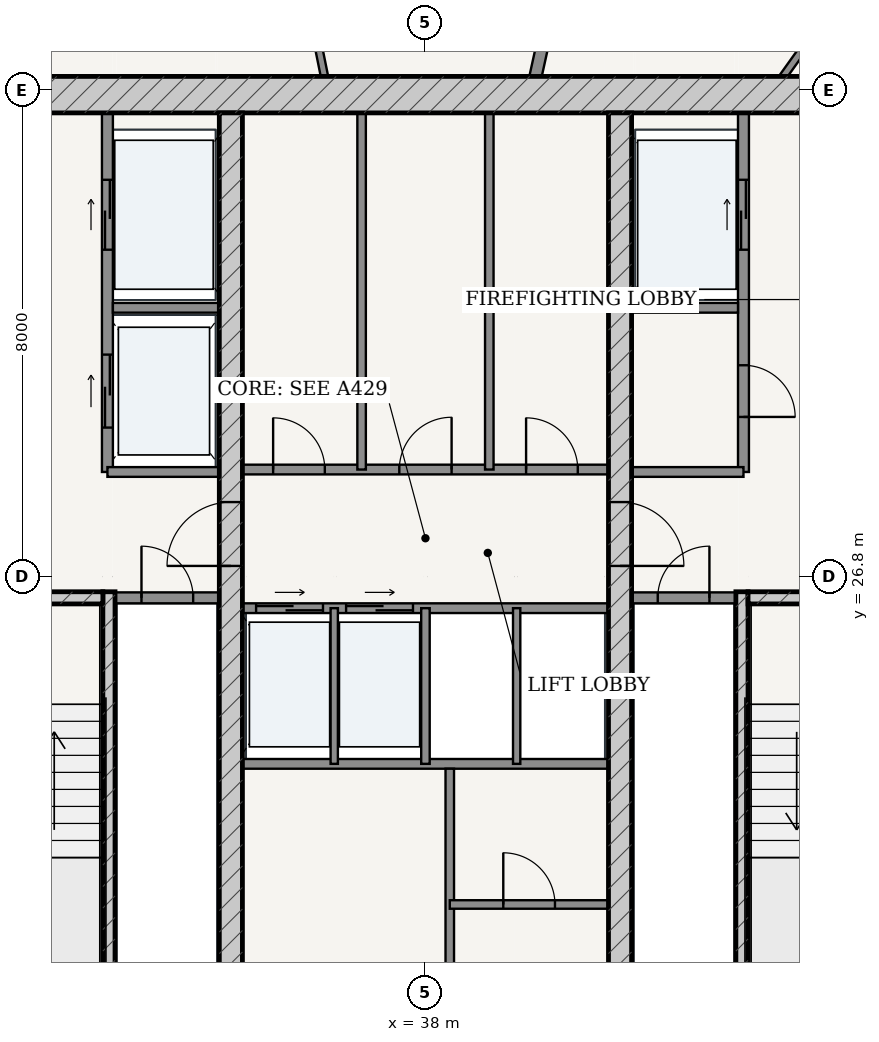
"""IFC4 building model, lengths in metres.
Left out: names, types, materials, properties, quantities, classifications, styles, units other than length and angle.
Written with IfcOpenShell. Run it as: python <this file> out.ifc"""

import sys

from ifc_helpers import new_model, si_unit, direction, frame, frame_2d, origin, place, context, subcontext, project, spatial, rectangle, extrude, source, transform, mapped, element, fill, save


model = new_model("IFC4")
c1 = context("Model", 3, precision=1e-05, world=origin(), true_north=direction((-0.2419218956, 0.970295726276)))
c2 = subcontext(c1, "Body", "Model", "MODEL_VIEW")
j1 = project(units=[si_unit("LENGTHUNIT", "METRE"), si_unit("PLANEANGLEUNIT", "RADIAN")], contexts=[c1])
p1 = place(None, origin())
s1 = spatial("IfcSite", under=j1, at=p1, CompositionType="ELEMENT")
p2 = place(p1, origin())
s2 = spatial("IfcBuilding", under=s1, at=p2, CompositionType="ELEMENT")
p3 = place(p2, frame((0.0, 0.0, 217.1)))
s3 = spatial("IfcBuildingStorey", under=s2, at=p3, CompositionType="ELEMENT", Elevation=217.1)
p4 = place(p3, frame((28.775, 34.725, 0.0), z_axis=(0.0, 0.0, 1.0), x_axis=(1.0, 0.0, 0.0)))
e1 = element("IfcWall", 1, at=p4, inside=s3, PredefinedType="SHEAR", context=c2, shape_type="SweptSolid", body=[
    extrude(rectangle(XDim=18.45, YDim=0.6, at=frame_2d((9.225, 0.0))), origin(), (0.0, 0.0, 1.0), 3.435),
])
p5 = place(p3, frame((32.795, 19.175, 0.0), z_axis=(0.0, 0.0, 1.0), x_axis=(0.0, 1.0, 0.0)))
e2 = element("IfcWall", 2, at=p5, inside=s3, PredefinedType="SOLIDWALL", context=c2, shape_type="SweptSolid", body=[
    extrude(rectangle(XDim=7.375, YDim=0.2, at=frame_2d((3.688, 0.0))), origin(), (0.0, 0.0, 1.0), 3.435),
])
p6 = place(p3, frame((29.375, 26.45, 0.0), z_axis=(0.0, 0.0, 1.0), x_axis=(1.0, 0.0, 0.0)))
e3 = element("IfcWall", 3, at=p6, inside=s3, PredefinedType="SOLIDWALL", context=c2, shape_type="SweptSolid", body=[
    extrude(rectangle(XDim=3.32, YDim=0.2, at=frame_2d((1.66, 0.0))), origin(), (0.0, 0.0, 1.0), 3.435),
])
p7 = place(p6, frame((1.185, 0.0, 0.0)))
e4 = element("IfcOpeningElement", 4, at=p7, cuts=e3, PredefinedType="OPENING", context=c2, shape_type="SweptSolid", body=[
    extrude(rectangle(XDim=0.95, YDim=2.15, at=frame_2d((0.475, 1.075))), frame((0.0, 0.11, 0.0), z_axis=(0.0, -1.0, 0.0), x_axis=(1.0, 0.0, 0.0)), (0.0, 0.0, 1.0), 0.22),
])
p8 = place(p3, frame((43.205, 19.175, 0.0), z_axis=(0.0, 0.0, 1.0), x_axis=(0.0, 1.0, 0.0)))
e5 = element("IfcWall", 5, at=p8, inside=s3, PredefinedType="SOLIDWALL", context=c2, shape_type="SweptSolid", body=[
    extrude(rectangle(XDim=7.375, YDim=0.2, at=frame_2d((3.688, 0.0))), origin(), (0.0, 0.0, 1.0), 3.435),
])
p9 = place(p3, frame((43.305, 26.45, 0.0), z_axis=(0.0, 0.0, 1.0), x_axis=(1.0, 0.0, 0.0)))
e6 = element("IfcWall", 6, at=p9, inside=s3, PredefinedType="SOLIDWALL", context=c2, shape_type="SweptSolid", body=[
    extrude(rectangle(XDim=3.32, YDim=0.2, at=frame_2d((1.66, 0.0))), origin(), (0.0, 0.0, 1.0), 3.435),
])
p10 = place(p9, frame((1.185, 0.0, 0.0)))
e7 = element("IfcOpeningElement", 7, at=p10, cuts=e6, PredefinedType="OPENING", context=c2, shape_type="SweptSolid", body=[
    extrude(rectangle(XDim=0.95, YDim=2.15, at=frame_2d((0.475, 1.075))), frame((0.0, 0.11, 0.0), z_axis=(0.0, -1.0, 0.0), x_axis=(1.0, 0.0, 0.0)), (0.0, 0.0, 1.0), 0.22),
])
p11 = place(p3, frame((34.8, 19.175, 0.0), z_axis=(0.0, 0.0, 1.0), x_axis=(0.0, 1.0, 0.0)))
e8 = element("IfcWall", 8, at=p11, inside=s3, PredefinedType="SHEAR", context=c2, shape_type="SweptSolid", body=[
    extrude(rectangle(XDim=15.25, YDim=0.38, at=frame_2d((7.625, 0.0))), origin(), (0.0, 0.0, 1.0), 3.435),
])
p12 = place(p11, frame((7.8, 0.0, 0.0)))
e9 = element("IfcOpeningElement", 9, at=p12, cuts=e8, PredefinedType="OPENING", context=c2, shape_type="SweptSolid", body=[
    extrude(rectangle(XDim=1.05, YDim=2.15, at=frame_2d((0.525, 1.075))), frame((0.0, 0.2, 0.0), z_axis=(0.0, -1.0, 0.0), x_axis=(1.0, 0.0, 0.0)), (0.0, 0.0, 1.0), 0.4),
])
p13 = place(p3, frame((41.2, 19.175, 0.0), z_axis=(0.0, 0.0, 1.0), x_axis=(0.0, 1.0, 0.0)))
e10 = element("IfcWall", 10, at=p13, inside=s3, PredefinedType="SHEAR", context=c2, shape_type="SweptSolid", body=[
    extrude(rectangle(XDim=15.25, YDim=0.38, at=frame_2d((7.625, 0.0))), origin(), (0.0, 0.0, 1.0), 3.435),
])
p14 = place(p13, frame((7.8, 0.0, 0.0)))
e11 = element("IfcOpeningElement", 11, at=p14, cuts=e10, PredefinedType="OPENING", context=c2, shape_type="SweptSolid", body=[
    extrude(rectangle(XDim=1.05, YDim=2.15, at=frame_2d((0.525, 1.075))), frame((0.0, 0.2, 0.0), z_axis=(0.0, -1.0, 0.0), x_axis=(1.0, 0.0, 0.0)), (0.0, 0.0, 1.0), 0.4),
])
p15 = place(p3, frame((32.9, 26.45, 0.0), z_axis=(0.0, 0.0, 1.0), x_axis=(1.0, 0.0, 0.0)))
e12 = element("IfcWall", 12, at=p15, inside=s3, PredefinedType="PARTITIONING", context=c2, shape_type="SweptSolid", body=[
    extrude(rectangle(XDim=1.71, YDim=0.18, at=frame_2d((0.855, 0.0))), origin(), (0.0, 0.0, 1.0), 3.435),
])
p16 = place(p15, frame((0.43, 0.0, 0.0)))
e13 = element("IfcOpeningElement", 13, at=p16, cuts=e12, PredefinedType="OPENING", context=c2, shape_type="SweptSolid", body=[
    extrude(rectangle(XDim=0.85, YDim=2.1, at=frame_2d((0.425, 1.05))), frame((0.0, 0.1, 0.0), z_axis=(0.0, -1.0, 0.0), x_axis=(1.0, 0.0, 0.0)), (0.0, 0.0, 1.0), 0.2),
])
p17 = place(p3, frame((41.39, 26.45, 0.0), z_axis=(0.0, 0.0, 1.0), x_axis=(1.0, 0.0, 0.0)))
e14 = element("IfcWall", 14, at=p17, inside=s3, PredefinedType="PARTITIONING", context=c2, shape_type="SweptSolid", body=[
    extrude(rectangle(XDim=1.71, YDim=0.18, at=frame_2d((0.855, 0.0))), origin(), (0.0, 0.0, 1.0), 3.435),
])
p18 = place(p17, frame((0.43, 0.0, 0.0)))
e15 = element("IfcOpeningElement", 15, at=p18, cuts=e14, PredefinedType="OPENING", context=c2, shape_type="SweptSolid", body=[
    extrude(rectangle(XDim=0.85, YDim=2.1, at=frame_2d((0.425, 1.05))), frame((0.0, 0.1, 0.0), z_axis=(0.0, -1.0, 0.0), x_axis=(1.0, 0.0, 0.0)), (0.0, 0.0, 1.0), 0.2),
])
p19 = place(p3, frame((32.77, 28.52, 0.0), z_axis=(0.0, 0.0, 1.0), x_axis=(0.0, 1.0, 0.0)))
e16 = element("IfcWall", 16, at=p19, inside=s3, PredefinedType="PARTITIONING", context=c2, shape_type="SweptSolid", body=[
    extrude(rectangle(XDim=5.905, YDim=0.18, at=frame_2d((2.953, 0.0))), origin(), (0.0, 0.0, 1.0), 3.435),
])
p20 = place(p19, frame((3.655, 0.0, 0.0)))
e17 = element("IfcOpeningElement", 17, at=p20, cuts=e16, PredefinedType="OPENING", context=c2, shape_type="SweptSolid", body=[
    extrude(rectangle(XDim=1.15, YDim=2.2, at=frame_2d((0.575, 1.1))), frame((0.0, 0.1, 0.0), z_axis=(0.0, -1.0, 0.0), x_axis=(1.0, 0.0, 0.0)), (0.0, 0.0, 1.0), 0.2),
])
p21 = place(p19, frame((0.73, 0.0, 0.0)))
e18 = element("IfcOpeningElement", 18, at=p21, cuts=e16, PredefinedType="OPENING", context=c2, shape_type="SweptSolid", body=[
    extrude(rectangle(XDim=1.2, YDim=2.25, at=frame_2d((0.6, 1.125))), frame((0.0, 0.1, 0.0), z_axis=(0.0, -1.0, 0.0), x_axis=(1.0, 0.0, 0.0)), (0.0, 0.0, 1.0), 0.2),
])
p22 = place(p3, frame((32.86, 31.22, 0.0), z_axis=(0.0, 0.0, 1.0), x_axis=(1.0, 0.0, 0.0)))
e19 = element("IfcWall", 19, at=p22, inside=s3, PredefinedType="PARTITIONING", context=c2, shape_type="SweptSolid", body=[
    extrude(rectangle(XDim=1.75, YDim=0.16, at=frame_2d((0.875, 0.0))), origin(), (0.0, 0.0, 1.0), 3.435),
])
p23 = place(p3, frame((32.77, 28.52, 0.0), z_axis=(0.0, 0.0, 1.0), x_axis=(1.0, 0.0, 0.0)))
e20 = element("IfcWall", 20, at=p23, inside=s3, PredefinedType="PARTITIONING", context=c2, shape_type="SweptSolid", body=[
    extrude(rectangle(XDim=1.84, YDim=0.16, at=frame_2d((0.92, 0.0))), origin(), (0.0, 0.0, 1.0), 3.435),
])
p24 = place(p3, frame((43.23, 28.52, 0.0), z_axis=(0.0, 0.0, 1.0), x_axis=(0.0, 1.0, 0.0)))
e21 = element("IfcWall", 21, at=p24, inside=s3, PredefinedType="PARTITIONING", context=c2, shape_type="SweptSolid", body=[
    extrude(rectangle(XDim=5.905, YDim=0.18, at=frame_2d((2.953, 0.0))), origin(), (0.0, 0.0, 1.0), 3.435),
])
p25 = place(p24, frame((0.905, 0.0, 0.0)))
e22 = element("IfcOpeningElement", 22, at=p25, cuts=e21, PredefinedType="OPENING", context=c2, shape_type="SweptSolid", body=[
    extrude(rectangle(XDim=0.85, YDim=2.1, at=frame_2d((0.425, 1.05))), frame((0.0, 0.1, 0.0), z_axis=(0.0, -1.0, 0.0), x_axis=(1.0, 0.0, 0.0)), (0.0, 0.0, 1.0), 0.2),
])
p26 = place(p24, frame((3.655, 0.0, 0.0)))
e23 = element("IfcOpeningElement", 23, at=p26, cuts=e21, PredefinedType="OPENING", context=c2, shape_type="SweptSolid", body=[
    extrude(rectangle(XDim=1.15, YDim=2.2, at=frame_2d((0.575, 1.1))), frame((0.0, 0.1, 0.0), z_axis=(0.0, -1.0, 0.0), x_axis=(1.0, 0.0, 0.0)), (0.0, 0.0, 1.0), 0.2),
])
p27 = place(p3, frame((41.39, 31.22, 0.0), z_axis=(0.0, 0.0, 1.0), x_axis=(1.0, 0.0, 0.0)))
e24 = element("IfcWall", 24, at=p27, inside=s3, PredefinedType="PARTITIONING", context=c2, shape_type="SweptSolid", body=[
    extrude(rectangle(XDim=1.75, YDim=0.16, at=frame_2d((0.875, 0.0))), origin(), (0.0, 0.0, 1.0), 3.435),
])
p28 = place(p3, frame((41.39, 28.52, 0.0), z_axis=(0.0, 0.0, 1.0), x_axis=(1.0, 0.0, 0.0)))
e25 = element("IfcWall", 25, at=p28, inside=s3, PredefinedType="PARTITIONING", context=c2, shape_type="SweptSolid", body=[
    extrude(rectangle(XDim=1.84, YDim=0.16, at=frame_2d((0.92, 0.0))), origin(), (0.0, 0.0, 1.0), 3.435),
])
p29 = place(p3, frame((34.99, 28.56, 0.0), z_axis=(0.0, 0.0, 1.0), x_axis=(1.0, 0.0, 0.0)))
e26 = element("IfcWall", 26, at=p29, inside=s3, PredefinedType="PARTITIONING", context=c2, shape_type="SweptSolid", body=[
    extrude(rectangle(XDim=6.02, YDim=0.16, at=frame_2d((3.01, 0.0))), origin(), (0.0, 0.0, 1.0), 3.435),
])
p30 = place(p29, frame((0.505, 0.0, 0.0)))
e27 = element("IfcOpeningElement", 27, at=p30, cuts=e26, PredefinedType="OPENING", context=c2, shape_type="SweptSolid", body=[
    extrude(rectangle(XDim=0.85, YDim=2.1, at=frame_2d((0.425, 1.05))), frame((0.0, 0.09, 0.0), z_axis=(0.0, -1.0, 0.0), x_axis=(1.0, 0.0, 0.0)), (0.0, 0.0, 1.0), 0.18),
])
p31 = place(p29, frame((2.58, 0.0, 0.0)))
e28 = element("IfcOpeningElement", 28, at=p31, cuts=e26, PredefinedType="OPENING", context=c2, shape_type="SweptSolid", body=[
    extrude(rectangle(XDim=0.86, YDim=2.1, at=frame_2d((0.43, 1.05))), frame((0.0, 0.09, 0.0), z_axis=(0.0, -1.0, 0.0), x_axis=(1.0, 0.0, 0.0)), (0.0, 0.0, 1.0), 0.18),
])
p32 = place(p29, frame((4.665, 0.0, 0.0)))
e29 = element("IfcOpeningElement", 29, at=p32, cuts=e26, PredefinedType="OPENING", context=c2, shape_type="SweptSolid", body=[
    extrude(rectangle(XDim=0.85, YDim=2.1, at=frame_2d((0.425, 1.05))), frame((0.0, 0.09, 0.0), z_axis=(0.0, -1.0, 0.0), x_axis=(1.0, 0.0, 0.0)), (0.0, 0.0, 1.0), 0.18),
])
for number, where, z_axis, x_axis in (
    (30, (36.95, 28.56, 0.0), (0.0, 0.0, 1.0), (0.0, 1.0, 0.0)),
    (31, (39.05, 28.56, 0.0), (0.0, 0.0, 1.0), (0.0, 1.0, 0.0)),
):
    element("IfcWall", number, at=place(p3, frame(where, z_axis=z_axis, x_axis=x_axis)), inside=s3, PredefinedType="PARTITIONING", context=c2, shape_type="SweptSolid", body=[
        extrude(rectangle(XDim=5.865, YDim=0.14, at=frame_2d((2.933, 0.0))), origin(), (0.0, 0.0, 1.0), 3.435),
    ])
p33 = place(p3, frame((34.99, 26.28, 0.0), z_axis=(0.0, 0.0, 1.0), x_axis=(1.0, 0.0, 0.0)))
e32 = element("IfcWall", 32, at=p33, inside=s3, PredefinedType="PARTITIONING", context=c2, shape_type="SweptSolid", body=[
    extrude(rectangle(XDim=6.02, YDim=0.16, at=frame_2d((3.01, 0.0))), origin(), (0.0, 0.0, 1.0), 3.435),
])
p34 = place(p33, frame((0.225, 0.0, 0.0)))
e33 = element("IfcOpeningElement", 33, at=p34, cuts=e32, PredefinedType="OPENING", context=c2, shape_type="SweptSolid", body=[
    extrude(rectangle(XDim=1.1, YDim=2.2, at=frame_2d((0.55, 1.1))), frame((0.0, 0.09, 0.0), z_axis=(0.0, -1.0, 0.0), x_axis=(1.0, 0.0, 0.0)), (0.0, 0.0, 1.0), 0.18),
])
p35 = place(p33, frame((1.705, 0.0, 0.0)))
e34 = element("IfcOpeningElement", 34, at=p35, cuts=e32, PredefinedType="OPENING", context=c2, shape_type="SweptSolid", body=[
    extrude(rectangle(XDim=1.1, YDim=2.2, at=frame_2d((0.55, 1.1))), frame((0.0, 0.09, 0.0), z_axis=(0.0, -1.0, 0.0), x_axis=(1.0, 0.0, 0.0)), (0.0, 0.0, 1.0), 0.18),
])
p36 = place(p3, frame((34.99, 23.72, 0.0), z_axis=(0.0, 0.0, 1.0), x_axis=(1.0, 0.0, 0.0)))
e35 = element("IfcWall", 35, at=p36, inside=s3, PredefinedType="PARTITIONING", context=c2, shape_type="SweptSolid", body=[
    extrude(rectangle(XDim=6.02, YDim=0.16, at=frame_2d((3.01, 0.0))), origin(), (0.0, 0.0, 1.0), 3.435),
])
p37 = place(p3, frame((36.5, 23.72, 0.0), z_axis=(0.0, 0.0, 1.0), x_axis=(0.0, 1.0, 0.0)))
e36 = element("IfcWall", 36, at=p37, inside=s3, PredefinedType="PARTITIONING", context=c2, shape_type="SweptSolid", body=[
    extrude(rectangle(XDim=2.56, YDim=0.12, at=frame_2d((1.28, 0.0))), origin(), (0.0, 0.0, 1.0), 3.435),
])
p38 = place(p3, frame((38.0, 23.72, 0.0), z_axis=(0.0, 0.0, 1.0), x_axis=(0.0, 1.0, 0.0)))
e37 = element("IfcWall", 37, at=p38, inside=s3, PredefinedType="PARTITIONING", context=c2, shape_type="SweptSolid", body=[
    extrude(rectangle(XDim=2.56, YDim=0.14, at=frame_2d((1.28, 0.0))), origin(), (0.0, 0.0, 1.0), 3.435),
])
p39 = place(p3, frame((39.5, 23.72, 0.0), z_axis=(0.0, 0.0, 1.0), x_axis=(0.0, 1.0, 0.0)))
e38 = element("IfcWall", 38, at=p39, inside=s3, PredefinedType="PARTITIONING", context=c2, shape_type="SweptSolid", body=[
    extrude(rectangle(XDim=2.56, YDim=0.12, at=frame_2d((1.28, 0.0))), origin(), (0.0, 0.0, 1.0), 3.435),
])
p40 = place(p3, frame((38.4, 19.175, 0.0), z_axis=(0.0, 0.0, 1.0), x_axis=(0.0, 1.0, 0.0)))
e39 = element("IfcWall", 39, at=p40, inside=s3, PredefinedType="PARTITIONING", context=c2, shape_type="SweptSolid", body=[
    extrude(rectangle(XDim=4.465, YDim=0.14, at=frame_2d((2.232, 0.0))), origin(), (0.0, 0.0, 1.0), 3.435),
])
p41 = place(p3, frame((38.4, 21.407, 0.0), z_axis=(0.0, 0.0, 1.0), x_axis=(1.0, 0.0, 0.0)))
e40 = element("IfcWall", 40, at=p41, inside=s3, PredefinedType="PARTITIONING", context=c2, shape_type="SweptSolid", body=[
    extrude(rectangle(XDim=2.61, YDim=0.14, at=frame_2d((1.305, 0.0))), origin(), (0.0, 0.0, 1.0), 3.435),
])
p42 = place(p41, frame((0.88, 0.0, 0.0)))
e41 = element("IfcOpeningElement", 41, at=p42, cuts=e40, PredefinedType="OPENING", context=c2, shape_type="SweptSolid", body=[
    extrude(rectangle(XDim=0.85, YDim=2.1, at=frame_2d((0.425, 1.05))), frame((0.0, 0.08, 0.0), z_axis=(0.0, -1.0, 0.0), x_axis=(1.0, 0.0, 0.0)), (0.0, 0.0, 1.0), 0.16),
])
p43 = place(p3, frame((43.885, 35.027, 0.0), z_axis=(0.0, 0.0, 1.0), x_axis=(0.581801309538, 0.813330951225, 0.0)))
e42 = element("IfcWall", 42, at=p43, inside=s3, PredefinedType="PARTITIONING", context=c2, shape_type="SweptSolid", body=[
    extrude(rectangle(XDim=3.526, YDim=0.12, at=frame_2d((1.763, 0.0))), origin(), (0.0, 0.0, 1.0), 3.435),
])
p44 = place(p43, frame((1.313, 0.0, 0.0)))
e43 = element("IfcOpeningElement", 43, at=p44, cuts=e42, PredefinedType="OPENING", context=c2, shape_type="SweptSolid", body=[
    extrude(rectangle(XDim=0.9, YDim=2.15, at=frame_2d((0.45, 1.075))), frame((0.0, 0.07, 0.0), z_axis=(0.0, -1.0, 0.0), x_axis=(1.0, 0.0, 0.0)), (0.0, 0.0, 1.0), 0.14),
])
p45 = place(p3, frame((39.811, 35.027, 0.0), z_axis=(0.0, 0.0, 1.0), x_axis=(0.214966857327, 0.976621344356, 0.0)))
e44 = element("IfcWall", 44, at=p45, inside=s3, PredefinedType="PARTITIONING", context=c2, shape_type="SweptSolid", body=[
    extrude(rectangle(XDim=11.258, YDim=0.2, at=frame_2d((5.629, 0.0))), origin(), (0.0, 0.0, 1.0), 2.52),
])
p46 = place(p3, frame((36.339, 35.027, 0.0), z_axis=(0.0, 0.0, 1.0), x_axis=(-0.197856196381, 0.980231057228, 0.0)))
e45 = element("IfcWall", 45, at=p46, inside=s3, PredefinedType="PARTITIONING", context=c2, shape_type="SweptSolid", body=[
    extrude(rectangle(XDim=2.752, YDim=0.12, at=frame_2d((1.376, 0.0))), origin(), (0.0, 0.0, 1.0), 2.52),
])
m1 = source(origin(), c2, "Body", "SweptSolid", [
    extrude(rectangle(XDim=1.05, YDim=2.15, at=frame_2d((0.525, 1.075))), frame((0.0, 0.025, 0.0), z_axis=(0.0, -1.0, 0.0), x_axis=(1.0, 0.0, 0.0)), (0.0, 0.0, 1.0), 0.05),
])
p47 = place(p12, origin())
e46 = element("IfcDoor", 46, at=p47, inside=s3, OperationType="SINGLE_SWING_LEFT", PredefinedType="DOOR", context=c2, shape_type="MappedRepresentation", body=[
    mapped(m1, transform((0.0, 0.0, 0.0), scale=1.0)),
])
fill(e9, e46)
p48 = place(p14, frame((1.05, 0.0, 0.0), z_axis=(0.0, 0.0, 1.0), x_axis=(-1.0, 0.0, 0.0)))
e47 = element("IfcDoor", 47, at=p48, inside=s3, OperationType="SINGLE_SWING_RIGHT", PredefinedType="DOOR", context=c2, shape_type="MappedRepresentation", body=[
    mapped(m1, transform((0.0, 0.0, 0.0), scale=1.0)),
])
fill(e11, e47)
m2 = source(origin(), c2, "Body", "SweptSolid", [
    extrude(rectangle(XDim=0.85, YDim=2.1, at=frame_2d((0.425, 1.05))), frame((0.0, 0.025, 0.0), z_axis=(0.0, -1.0, 0.0), x_axis=(1.0, 0.0, 0.0)), (0.0, 0.0, 1.0), 0.05),
])
p49 = place(p16, origin())
e48 = element("IfcDoor", 48, at=p49, inside=s3, OperationType="SINGLE_SWING_LEFT", PredefinedType="DOOR", context=c2, shape_type="MappedRepresentation", body=[
    mapped(m2, transform((0.0, 0.0, 0.0), scale=1.0)),
])
fill(e13, e48)
p50 = place(p18, origin())
e49 = element("IfcDoor", 49, at=p50, inside=s3, OperationType="SINGLE_SWING_RIGHT", PredefinedType="DOOR", context=c2, shape_type="MappedRepresentation", body=[
    mapped(m2, transform((0.0, 0.0, 0.0), scale=1.0)),
])
fill(e15, e49)
p51 = place(p25, frame((0.85, 0.0, 0.0), z_axis=(0.0, 0.0, 1.0), x_axis=(-1.0, 0.0, 0.0)))
e50 = element("IfcDoor", 50, at=p51, inside=s3, OperationType="SINGLE_SWING_RIGHT", PredefinedType="DOOR", context=c2, shape_type="MappedRepresentation", body=[
    mapped(m2, transform((0.0, 0.0, 0.0), scale=1.0)),
])
fill(e22, e50)
p52 = place(p30, origin())
e51 = element("IfcDoor", 51, at=p52, inside=s3, OperationType="SINGLE_SWING_LEFT", PredefinedType="DOOR", context=c2, shape_type="MappedRepresentation", body=[
    mapped(m2, transform((0.0, 0.0, 0.0), scale=1.0)),
])
fill(e27, e51)
m3 = source(origin(), c2, "Body", "SweptSolid", [
    extrude(rectangle(XDim=0.86, YDim=2.1, at=frame_2d((0.43, 1.05))), frame((0.0, 0.025, 0.0), z_axis=(0.0, -1.0, 0.0), x_axis=(1.0, 0.0, 0.0)), (0.0, 0.0, 1.0), 0.05),
])
p53 = place(p31, origin())
e52 = element("IfcDoor", 52, at=p53, inside=s3, OperationType="SINGLE_SWING_RIGHT", PredefinedType="DOOR", context=c2, shape_type="MappedRepresentation", body=[
    mapped(m3, transform((0.0, 0.0, 0.0), scale=1.0)),
])
fill(e28, e52)
p54 = place(p32, origin())
e53 = element("IfcDoor", 53, at=p54, inside=s3, OperationType="SINGLE_SWING_LEFT", PredefinedType="DOOR", context=c2, shape_type="MappedRepresentation", body=[
    mapped(m2, transform((0.0, 0.0, 0.0), scale=1.0)),
])
fill(e29, e53)
p55 = place(p42, origin())
e54 = element("IfcDoor", 54, at=p55, inside=s3, OperationType="SINGLE_SWING_LEFT", PredefinedType="DOOR", context=c2, shape_type="MappedRepresentation", body=[
    mapped(m2, transform((0.0, 0.0, 0.0), scale=1.0)),
])
fill(e41, e54)
m4 = source(origin(), c2, "Body", "SweptSolid", [
    extrude(rectangle(XDim=1.15, YDim=2.2, at=frame_2d((0.575, 1.1))), frame((0.0, 0.025, 0.0), z_axis=(0.0, -1.0, 0.0), x_axis=(1.0, 0.0, 0.0)), (0.0, 0.0, 1.0), 0.05),
])
p56 = place(p20, origin())
e55 = element("IfcDoor", 55, at=p56, inside=s3, OperationType="DOUBLE_DOOR_SLIDING", PredefinedType="DOOR", context=c2, shape_type="MappedRepresentation", body=[
    mapped(m4, transform((0.0, 0.0, 0.0), scale=1.0)),
])
fill(e17, e55)
p57 = place(p26, origin())
e56 = element("IfcDoor", 56, at=p57, inside=s3, OperationType="DOUBLE_DOOR_SLIDING", PredefinedType="DOOR", context=c2, shape_type="MappedRepresentation", body=[
    mapped(m4, transform((0.0, 0.0, 0.0), scale=1.0)),
])
fill(e23, e56)
m5 = source(origin(), c2, "Body", "SweptSolid", [
    extrude(rectangle(XDim=1.2, YDim=2.25, at=frame_2d((0.6, 1.125))), frame((0.0, 0.025, 0.0), z_axis=(0.0, -1.0, 0.0), x_axis=(1.0, 0.0, 0.0)), (0.0, 0.0, 1.0), 0.05),
])
p58 = place(p21, origin())
e57 = element("IfcDoor", 57, at=p58, inside=s3, OperationType="DOUBLE_DOOR_SLIDING", PredefinedType="DOOR", context=c2, shape_type="MappedRepresentation", body=[
    mapped(m5, transform((0.0, 0.0, 0.0), scale=1.0)),
])
fill(e18, e57)
m6 = source(origin(), c2, "Body", "SweptSolid", [
    extrude(rectangle(XDim=1.1, YDim=2.2, at=frame_2d((0.55, 1.1))), frame((0.0, 0.025, 0.0), z_axis=(0.0, -1.0, 0.0), x_axis=(1.0, 0.0, 0.0)), (0.0, 0.0, 1.0), 0.05),
])
p59 = place(p34, origin())
e58 = element("IfcDoor", 58, at=p59, inside=s3, OperationType="DOUBLE_DOOR_SLIDING", PredefinedType="DOOR", context=c2, shape_type="MappedRepresentation", body=[
    mapped(m6, transform((0.0, 0.0, 0.0), scale=1.0)),
])
fill(e33, e58)
p60 = place(p35, origin())
e59 = element("IfcDoor", 59, at=p60, inside=s3, OperationType="DOUBLE_DOOR_SLIDING", PredefinedType="DOOR", context=c2, shape_type="MappedRepresentation", body=[
    mapped(m6, transform((0.0, 0.0, 0.0), scale=1.0)),
])
fill(e34, e59)
save(model, sys.argv[1])
